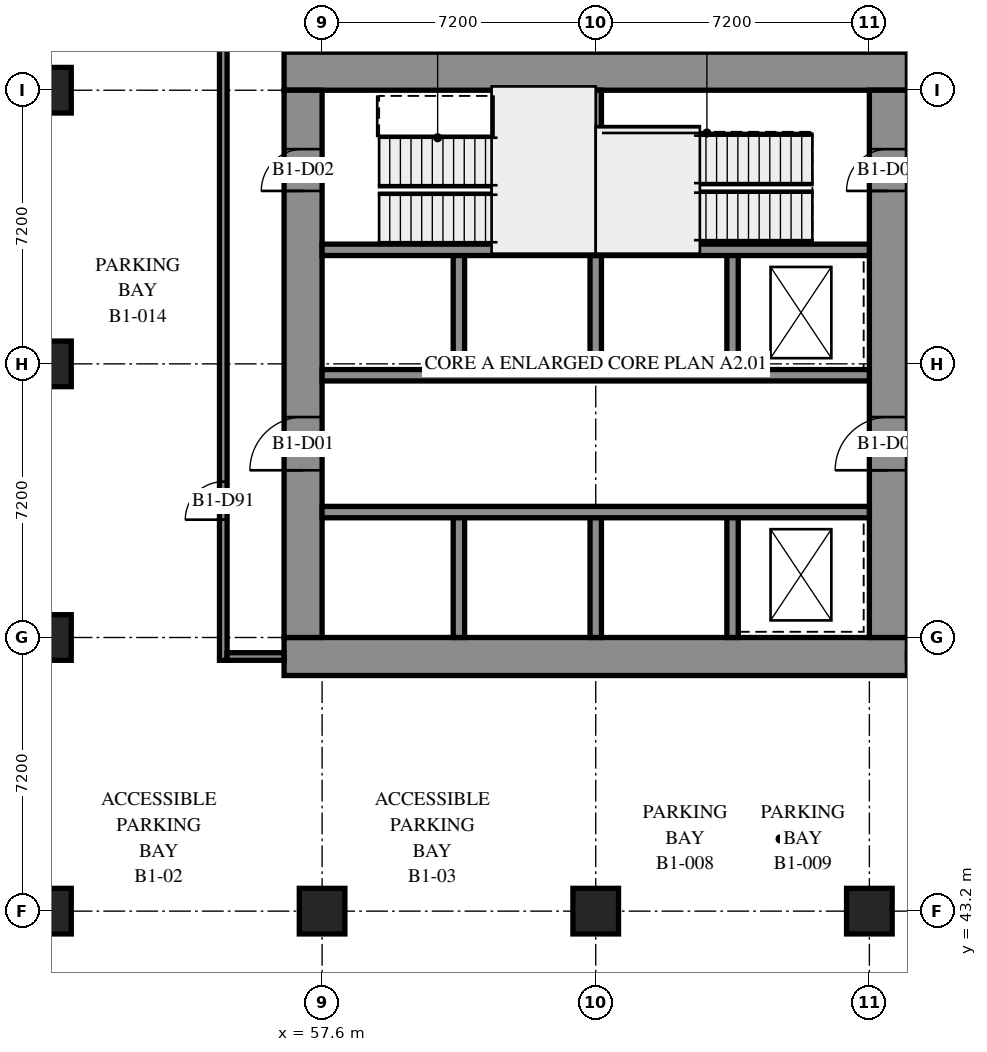
"""IFC4 building model, lengths in metres.
Left out: names, types, materials, properties, quantities, classifications, styles, units other than length and angle.
Written with IfcOpenShell. Run it as: python <this file> out.ifc"""

import sys

from ifc_helpers import new_model, si_unit, direction, frame, frame_2d, origin, origin_2d, place, context, subcontext, project, spatial, rectangle, extrude, element, fill, save


model = new_model("IFC4")
c1 = context("Model", 3, precision=1e-05, world=origin(), true_north=direction((0.0, 1.0)))
c2 = subcontext(c1, "Body", "Model", "MODEL_VIEW")
j1 = project(units=[si_unit("LENGTHUNIT", "METRE"), si_unit("PLANEANGLEUNIT", "RADIAN")], contexts=[c1])
p1 = place(None, origin())
s1 = spatial("IfcSite", under=j1, at=p1, CompositionType="ELEMENT")
p2 = place(p1, origin())
s2 = spatial("IfcBuilding", under=s1, at=p2, CompositionType="ELEMENT")
p3 = place(p2, frame((0.0, 0.0, -4.5)))
s3 = spatial("IfcBuildingStorey", under=s2, at=p3, CompositionType="ELEMENT", Elevation=-4.5)
for number, where, z_axis, x_axis in (
    (1, (50.4, 43.2, 0.0), (0.0, 0.0, 1.0), (1.0, 0.0, 0.0)),
    (2, (50.4, 50.4, 0.0), (0.0, 0.0, 1.0), (1.0, 0.0, 0.0)),
    (3, (50.4, 57.6, 0.0), (0.0, 0.0, 1.0), (1.0, 0.0, 0.0)),
    (4, (50.4, 64.8, 0.0), (0.0, 0.0, 1.0), (1.0, 0.0, 0.0)),
    (5, (57.6, 43.2, 0.0), (0.0, 0.0, 1.0), (1.0, 0.0, 0.0)),
    (6, (64.8, 43.2, 0.0), (0.0, 0.0, 1.0), (1.0, 0.0, 0.0)),
    (7, (72.0, 43.2, 0.0), (0.0, 0.0, 1.0), (1.0, 0.0, 0.0)),
):
    element("IfcColumn", number, at=place(p3, frame(where, z_axis=z_axis, x_axis=x_axis)), inside=s3, PredefinedType="COLUMN", context=c2, shape_type="SweptSolid", body=[
        extrude(rectangle(XDim=1.2, YDim=1.2, at=origin_2d()), origin(), (0.0, 0.0, 1.0), 4.1),
    ])
for number, where, z_axis, x_axis in (
    (8, (56.6, 49.9, -0.3), (0.0, 0.0, 1.0), (1.0, 0.0, 0.0)),
    (9, (56.6, 65.3, -0.3), (0.0, 0.0, 1.0), (1.0, 0.0, 0.0)),
):
    element("IfcWall", number, at=place(p3, frame(where, z_axis=z_axis, x_axis=x_axis)), inside=s3, PredefinedType="SHEAR", context=c2, shape_type="SweptSolid", body=[
        extrude(rectangle(XDim=16.4, YDim=1.0, at=frame_2d((8.2, 0.0))), origin(), (0.0, 0.0, 1.0), 3.7),
    ])
p4 = place(p3, frame((57.1, 50.4, -0.3), z_axis=(0.0, 0.0, 1.0), x_axis=(0.0, 1.0, 0.0)))
e10 = element("IfcWall", 10, at=p4, inside=s3, PredefinedType="SHEAR", context=c2, shape_type="SweptSolid", body=[
    extrude(rectangle(XDim=14.4, YDim=1.0, at=frame_2d((7.2, 0.0))), origin(), (0.0, 0.0, 1.0), 3.7),
])
p5 = place(p4, frame((4.4, 0.0, 0.3)))
e11 = element("IfcOpeningElement", 11, at=p5, cuts=e10, PredefinedType="OPENING", context=c2, shape_type="SweptSolid", body=[
    extrude(rectangle(XDim=1.4, YDim=2.1, at=frame_2d((0.7, 1.05))), frame((0.0, 0.51, 0.0), z_axis=(0.0, -1.0, 0.0), x_axis=(1.0, 0.0, 0.0)), (0.0, 0.0, 1.0), 1.02),
])
p6 = place(p4, frame((11.75, 0.0, 0.3)))
e12 = element("IfcOpeningElement", 12, at=p6, cuts=e10, PredefinedType="OPENING", context=c2, shape_type="SweptSolid", body=[
    extrude(rectangle(XDim=1.1, YDim=2.1, at=frame_2d((0.55, 1.05))), frame((0.0, 0.51, 0.0), z_axis=(0.0, -1.0, 0.0), x_axis=(1.0, 0.0, 0.0)), (0.0, 0.0, 1.0), 1.02),
])
p7 = place(p3, frame((72.5, 50.4, -0.3), z_axis=(0.0, 0.0, 1.0), x_axis=(0.0, 1.0, 0.0)))
e13 = element("IfcWall", 13, at=p7, inside=s3, PredefinedType="SHEAR", context=c2, shape_type="SweptSolid", body=[
    extrude(rectangle(XDim=14.4, YDim=1.0, at=frame_2d((7.2, 0.0))), origin(), (0.0, 0.0, 1.0), 3.7),
])
p8 = place(p7, frame((4.4, 0.0, 0.3)))
e14 = element("IfcOpeningElement", 14, at=p8, cuts=e13, PredefinedType="OPENING", context=c2, shape_type="SweptSolid", body=[
    extrude(rectangle(XDim=1.4, YDim=2.1, at=frame_2d((0.7, 1.05))), frame((0.0, 0.51, 0.0), z_axis=(0.0, -1.0, 0.0), x_axis=(1.0, 0.0, 0.0)), (0.0, 0.0, 1.0), 1.02),
])
p9 = place(p7, frame((11.75, 0.0, 0.3)))
e15 = element("IfcOpeningElement", 15, at=p9, cuts=e13, PredefinedType="OPENING", context=c2, shape_type="SweptSolid", body=[
    extrude(rectangle(XDim=1.1, YDim=2.1, at=frame_2d((0.55, 1.05))), frame((0.0, 0.51, 0.0), z_axis=(0.0, -1.0, 0.0), x_axis=(1.0, 0.0, 0.0)), (0.0, 0.0, 1.0), 1.02),
])
for number, where, z_axis, x_axis in (
    (16, (61.2, 50.4, 0.0), (0.0, 0.0, 1.0), (0.0, 1.0, 0.0)),
    (17, (61.2, 57.3, 0.0), (0.0, 0.0, 1.0), (0.0, 1.0, 0.0)),
    (18, (64.8, 50.4, 0.0), (0.0, 0.0, 1.0), (0.0, 1.0, 0.0)),
    (19, (64.8, 57.3, 0.0), (0.0, 0.0, 1.0), (0.0, 1.0, 0.0)),
    (20, (68.4, 50.4, 0.0), (0.0, 0.0, 1.0), (0.0, 1.0, 0.0)),
    (21, (68.4, 57.3, 0.0), (0.0, 0.0, 1.0), (0.0, 1.0, 0.0)),
):
    element("IfcWall", number, at=place(p3, frame(where, z_axis=z_axis, x_axis=x_axis)), inside=s3, PredefinedType="SOLIDWALL", context=c2, shape_type="SweptSolid", body=[
        extrude(rectangle(XDim=3.3, YDim=0.3, at=frame_2d((1.65, 0.0))), origin(), (0.0, 0.0, 1.0), 4.1),
    ])
for number, where, z_axis, x_axis in (
    (22, (57.6, 53.7, 0.0), (0.0, 0.0, 1.0), (1.0, 0.0, 0.0)),
    (23, (57.6, 57.3, 0.0), (0.0, 0.0, 1.0), (1.0, 0.0, 0.0)),
):
    element("IfcWall", number, at=place(p3, frame(where, z_axis=z_axis, x_axis=x_axis)), inside=s3, PredefinedType="SOLIDWALL", context=c2, shape_type="SweptSolid", body=[
        extrude(rectangle(XDim=14.4, YDim=0.3, at=frame_2d((7.2, 0.0))), origin(), (0.0, 0.0, 1.0), 4.1),
    ])
for number, where, z_axis, x_axis in (
    (24, (57.6, 60.6, 0.0), (0.0, 0.0, 1.0), (1.0, 0.0, 0.0)),
    (25, (64.8, 60.6, 0.0), (0.0, 0.0, 1.0), (1.0, 0.0, 0.0)),
):
    element("IfcWall", number, at=place(p3, frame(where, z_axis=z_axis, x_axis=x_axis)), inside=s3, PredefinedType="SOLIDWALL", context=c2, shape_type="SweptSolid", body=[
        extrude(rectangle(XDim=7.2, YDim=0.3, at=frame_2d((3.6, 0.0))), origin(), (0.0, 0.0, 1.0), 4.1),
    ])
p10 = place(p3, frame((64.8, 60.6, 0.0), z_axis=(0.0, 0.0, 1.0), x_axis=(0.0, 1.0, 0.0)))
e26 = element("IfcWall", 26, at=p10, inside=s3, PredefinedType="SOLIDWALL", context=c2, shape_type="SweptSolid", body=[
    extrude(rectangle(XDim=4.2, YDim=0.3, at=frame_2d((2.1, 0.0))), origin(), (0.0, 0.0, 1.0), 4.1),
])
p11 = place(p3, frame((55.0, 49.8, 0.0), z_axis=(0.0, 0.0, 1.0), x_axis=(0.0, 1.0, 0.0)))
e27 = element("IfcWall", 27, at=p11, inside=s3, PredefinedType="PARTITIONING", context=c2, shape_type="SweptSolid", body=[
    extrude(rectangle(XDim=17.7, YDim=0.2, at=frame_2d((8.85, 0.0))), origin(), (0.0, 0.0, 1.0), 4.1),
])
p12 = place(p11, frame((16.2, 0.0, 0.0)))
e28 = element("IfcOpeningElement", 28, at=p12, cuts=e27, PredefinedType="OPENING", context=c2, shape_type="SweptSolid", body=[
    extrude(rectangle(XDim=1.0, YDim=2.1, at=frame_2d((0.5, 1.05))), frame((0.0, 0.11, 0.0), z_axis=(0.0, -1.0, 0.0), x_axis=(1.0, 0.0, 0.0)), (0.0, 0.0, 1.0), 0.22),
])
p13 = place(p11, frame((3.7, 0.0, 0.0)))
e29 = element("IfcOpeningElement", 29, at=p13, cuts=e27, PredefinedType="OPENING", context=c2, shape_type="SweptSolid", body=[
    extrude(rectangle(XDim=1.0, YDim=2.1, at=frame_2d((0.5, 1.05))), frame((0.0, 0.11, 0.0), z_axis=(0.0, -1.0, 0.0), x_axis=(1.0, 0.0, 0.0)), (0.0, 0.0, 1.0), 0.22),
])
p14 = place(p3, frame((55.1, 49.9, 0.0), z_axis=(0.0, 0.0, 1.0), x_axis=(1.0, 0.0, 0.0)))
e30 = element("IfcWall", 30, at=p14, inside=s3, PredefinedType="PARTITIONING", context=c2, shape_type="SweptSolid", body=[
    extrude(rectangle(XDim=1.5, YDim=0.2, at=frame_2d((0.75, 0.0))), origin(), (0.0, 0.0, 1.0), 4.1),
])
p15 = place(p13, origin())
e31 = element("IfcDoor", 31, at=p15, inside=s3, OperationType="SINGLE_SWING_RIGHT", PredefinedType="DOOR", context=c2, shape_type="SweptSolid", body=[
    extrude(rectangle(XDim=1.0, YDim=2.1, at=frame_2d((0.5, 1.05))), frame((0.0, 0.025, 0.0), z_axis=(0.0, -1.0, 0.0), x_axis=(1.0, 0.0, 0.0)), (0.0, 0.0, 1.0), 0.05),
])
fill(e29, e31)
p16 = place(p5, origin())
e32 = element("IfcDoor", 32, at=p16, inside=s3, OperationType="SINGLE_SWING_RIGHT", PredefinedType="DOOR", context=c2, shape_type="SweptSolid", body=[
    extrude(rectangle(XDim=1.4, YDim=2.1, at=frame_2d((0.7, 1.05))), frame((0.0, 0.025, 0.0), z_axis=(0.0, -1.0, 0.0), x_axis=(1.0, 0.0, 0.0)), (0.0, 0.0, 1.0), 0.05),
])
fill(e11, e32)
p17 = place(p6, origin())
e33 = element("IfcDoor", 33, at=p17, inside=s3, OperationType="SINGLE_SWING_LEFT", PredefinedType="DOOR", context=c2, shape_type="SweptSolid", body=[
    extrude(rectangle(XDim=1.1, YDim=2.1, at=frame_2d((0.55, 1.05))), frame((0.0, 0.025, 0.0), z_axis=(0.0, -1.0, 0.0), x_axis=(1.0, 0.0, 0.0)), (0.0, 0.0, 1.0), 0.05),
])
fill(e12, e33)
p18 = place(p8, origin())
e34 = element("IfcDoor", 34, at=p18, inside=s3, OperationType="SINGLE_SWING_RIGHT", PredefinedType="DOOR", context=c2, shape_type="SweptSolid", body=[
    extrude(rectangle(XDim=1.4, YDim=2.1, at=frame_2d((0.7, 1.05))), frame((0.0, 0.025, 0.0), z_axis=(0.0, -1.0, 0.0), x_axis=(1.0, 0.0, 0.0)), (0.0, 0.0, 1.0), 0.05),
])
fill(e14, e34)
p19 = place(p9, origin())
e35 = element("IfcDoor", 35, at=p19, inside=s3, OperationType="SINGLE_SWING_LEFT", PredefinedType="DOOR", context=c2, shape_type="SweptSolid", body=[
    extrude(rectangle(XDim=1.1, YDim=2.1, at=frame_2d((0.55, 1.05))), frame((0.0, 0.025, 0.0), z_axis=(0.0, -1.0, 0.0), x_axis=(1.0, 0.0, 0.0)), (0.0, 0.0, 1.0), 0.05),
])
fill(e15, e35)
save(model, sys.argv[1])
